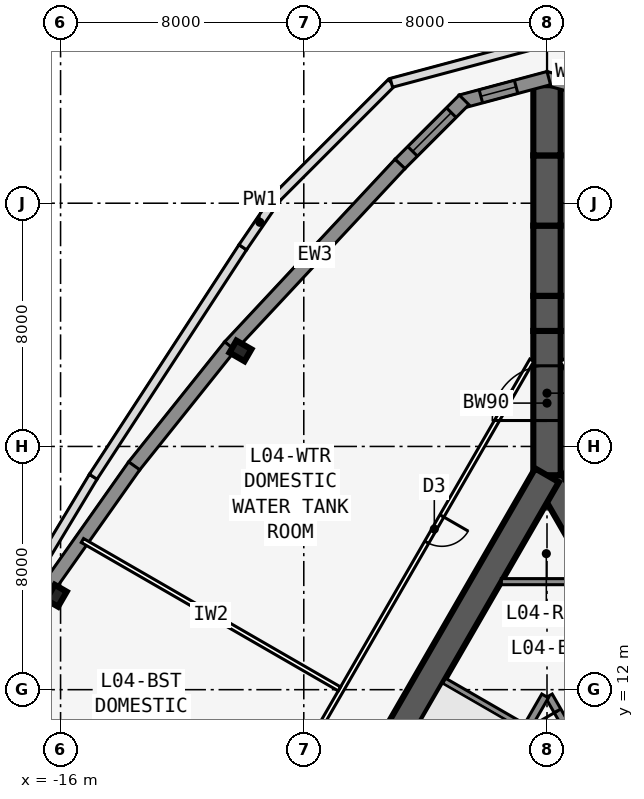
"""IFC4 building model, lengths in metres.
Left out: names, types, materials, properties, quantities, classifications, styles, units other than length and angle.
Written with IfcOpenShell. Run it as: python <this file> out.ifc"""

import sys

from ifc_helpers import new_model, si_unit, direction, frame, frame_2d, origin, origin_2d, place, context, subcontext, project, spatial, polyline, rectangle, i_section, outline, extrude, element, fill, save


model = new_model("IFC4")
c1 = context("Model", 3, precision=1e-05, world=origin(), true_north=direction((0.0, 1.0)))
c2 = subcontext(c1, "Body", "Model", "MODEL_VIEW")
j1 = project(units=[si_unit("LENGTHUNIT", "METRE"), si_unit("PLANEANGLEUNIT", "RADIAN")], contexts=[c1])
p1 = place(None, origin())
s1 = spatial("IfcSite", under=j1, at=p1, CompositionType="ELEMENT")
p2 = place(p1, origin())
s2 = spatial("IfcBuilding", under=s1, at=p2, CompositionType="ELEMENT")
p3 = place(p2, frame((0.0, 0.0, 22.5)))
s3 = spatial("IfcBuildingStorey", under=s2, at=p3, CompositionType="ELEMENT", Elevation=22.5)
p4 = place(p3, frame((16.5, -9.526, 0.0), z_axis=(0.0, 0.0, 1.0), x_axis=(-0.499999749417, 0.866025548458, 0.0)))
e1 = element("IfcWall", 1, at=p4, inside=s3, PredefinedType="SHEAR", context=c2, shape_type="SweptSolid", body=[
    extrude(rectangle(XDim=33.0, YDim=0.9, at=frame_2d((16.5, 0.0))), origin(), (0.0, 0.0, 1.0), 6.0),
])
p5 = place(p4, frame((14.15, 0.0, 0.0)))
e2 = element("IfcOpeningElement", 2, at=p5, cuts=e1, PredefinedType="OPENING", context=c2, shape_type="SweptSolid", body=[
    extrude(rectangle(XDim=1.8, YDim=2.13, at=frame_2d((0.9, 1.065))), frame((0.0, 0.46, 0.0), z_axis=(0.0, -1.0, 0.0), x_axis=(1.0, 0.0, 0.0)), (0.0, 0.0, 1.0), 0.92),
])
p6 = place(p4, frame((12.6, 0.0, 0.0)))
e3 = element("IfcOpeningElement", 3, at=p6, cuts=e1, PredefinedType="OPENING", context=c2, shape_type="SweptSolid", body=[
    extrude(rectangle(XDim=1.0, YDim=2.13, at=frame_2d((0.5, 1.065))), frame((0.0, 0.46, 0.0), z_axis=(0.0, -1.0, 0.0), x_axis=(1.0, 0.0, 0.0)), (0.0, 0.0, 1.0), 0.92),
])
p7 = place(p3, frame((5.379, 2.586, 0.0), z_axis=(0.0, 0.0, 1.0), x_axis=(-0.500001375892, 0.866024609411, 0.0)))
e4 = element("IfcWall", 4, at=p7, inside=s3, PredefinedType="SOLIDWALL", context=c2, shape_type="SweptSolid", body=[
    extrude(rectangle(XDim=10.633, YDim=0.25, at=frame_2d((5.316, 0.0))), origin(), (0.0, 0.0, 1.0), 5.835),
])
p8 = place(p7, frame((9.164, 0.0, 0.0)))
e5 = element("IfcOpeningElement", 5, at=p8, cuts=e4, PredefinedType="OPENING", context=c2, shape_type="SweptSolid", body=[
    extrude(rectangle(XDim=0.9, YDim=2.13, at=frame_2d((0.45, 1.065))), frame((0.0, 0.135, 0.0), z_axis=(0.0, -1.0, 0.0), x_axis=(1.0, 0.0, 0.0)), (0.0, 0.0, 1.0), 0.27),
])
p9 = place(p7, frame((1.0, 0.0, 0.0)))
e6 = element("IfcOpeningElement", 6, at=p9, cuts=e4, PredefinedType="OPENING", context=c2, shape_type="SweptSolid", body=[
    extrude(rectangle(XDim=1.1, YDim=2.13, at=frame_2d((0.55, 1.065))), frame((0.0, 0.135, 0.0), z_axis=(0.0, -1.0, 0.0), x_axis=(1.0, 0.0, 0.0)), (0.0, 0.0, 1.0), 0.27),
])
p10 = place(p7, frame((3.9, 0.0, 0.0)))
e7 = element("IfcOpeningElement", 7, at=p10, cuts=e4, PredefinedType="OPENING", context=c2, shape_type="SweptSolid", body=[
    extrude(rectangle(XDim=1.1, YDim=2.13, at=frame_2d((0.55, 1.065))), frame((0.0, 0.135, 0.0), z_axis=(0.0, -1.0, 0.0), x_axis=(1.0, 0.0, 0.0)), (0.0, 0.0, 1.0), 0.27),
])
p11 = place(p7, frame((6.8, 0.0, 0.0)))
e8 = element("IfcOpeningElement", 8, at=p11, cuts=e4, PredefinedType="OPENING", context=c2, shape_type="SweptSolid", body=[
    extrude(rectangle(XDim=1.1, YDim=2.13, at=frame_2d((0.55, 1.065))), frame((0.0, 0.135, 0.0), z_axis=(0.0, -1.0, 0.0), x_axis=(1.0, 0.0, 0.0)), (0.0, 0.0, 1.0), 0.27),
])
p12 = place(p3, frame((0.0, 19.052, 0.0), z_axis=(0.0, 0.0, 1.0), x_axis=(-0.499999749417, -0.866025548458, 0.0)))
e9 = element("IfcWall", 9, at=p12, inside=s3, PredefinedType="SHEAR", context=c2, shape_type="SweptSolid", body=[
    extrude(rectangle(XDim=33.0, YDim=0.9, at=frame_2d((16.5, 0.0))), origin(), (0.0, 0.0, 1.0), 6.0),
])
p13 = place(p12, frame((14.15, 0.0, 0.0)))
e10 = element("IfcOpeningElement", 10, at=p13, cuts=e9, PredefinedType="OPENING", context=c2, shape_type="SweptSolid", body=[
    extrude(rectangle(XDim=1.8, YDim=2.13, at=frame_2d((0.9, 1.065))), frame((0.0, 0.46, 0.0), z_axis=(0.0, -1.0, 0.0), x_axis=(1.0, 0.0, 0.0)), (0.0, 0.0, 1.0), 0.92),
])
p14 = place(p12, frame((12.6, 0.0, 0.0)))
e11 = element("IfcOpeningElement", 11, at=p14, cuts=e9, PredefinedType="OPENING", context=c2, shape_type="SweptSolid", body=[
    extrude(rectangle(XDim=1.0, YDim=2.13, at=frame_2d((0.5, 1.065))), frame((0.0, 0.46, 0.0), z_axis=(0.0, -1.0, 0.0), x_axis=(1.0, 0.0, 0.0)), (0.0, 0.0, 1.0), 0.92),
])
p15 = place(p3, frame((-0.062, 11.794, 0.0), z_axis=(0.0, 0.0, 1.0), x_axis=(-0.500006680225, -0.86602154692, 0.0)))
e12 = element("IfcWall", 12, at=p15, inside=s3, PredefinedType="SOLIDWALL", context=c2, shape_type="SweptSolid", body=[
    extrude(rectangle(XDim=7.733, YDim=0.25, at=frame_2d((3.866, 0.0))), origin(), (0.0, 0.0, 1.0), 5.835),
])
p16 = place(p3, frame((-0.679, 10.727, 0.0), z_axis=(0.0, 0.0, 1.0), x_axis=(-0.866022959057, 0.500004234368, 0.0)))
e13 = element("IfcWall", 13, at=p16, inside=s3, PredefinedType="SOLIDWALL", context=c2, shape_type="SweptSolid", body=[
    extrude(rectangle(XDim=3.125, YDim=0.2, at=frame_2d((1.562, 0.0))), origin(), (0.0, 0.0, 1.0), 5.835),
])
p17 = place(p3, frame((0.0, 19.052, 0.0), z_axis=(0.0, 0.0, 1.0), x_axis=(0.0, 1.0, 0.0)))
e14 = element("IfcWall", 14, at=p17, inside=s3, PredefinedType="SHEAR", context=c2, shape_type="SweptSolid", body=[
    extrude(rectangle(XDim=4.746, YDim=0.9, at=frame_2d((2.373, 0.0))), origin(), (0.0, 0.0, 1.0), 6.0),
])
p18 = place(p17, frame((1.8, 0.0, 0.0)))
e15 = element("IfcOpeningElement", 15, at=p18, cuts=e14, PredefinedType="OPENING", context=c2, shape_type="SweptSolid", body=[
    extrude(rectangle(XDim=1.8, YDim=2.13, at=frame_2d((0.9, 1.065))), frame((0.0, 0.46, 0.0), z_axis=(0.0, -1.0, 0.0), x_axis=(1.0, 0.0, 0.0)), (0.0, 0.0, 1.0), 0.92),
])
p19 = place(p3, frame((0.0, 23.799, 0.0), z_axis=(0.0, 0.0, 1.0), x_axis=(0.0, 1.0, 0.0)))
e16 = element("IfcWall", 16, at=p19, inside=s3, PredefinedType="SHEAR", context=c2, shape_type="SweptSolid", body=[
    extrude(rectangle(XDim=1.155, YDim=0.9, at=frame_2d((0.577, 0.0))), origin(), (0.0, 0.0, 1.0), 6.0),
])
p20 = place(p3, frame((0.0, 24.953, 0.0), z_axis=(0.0, 0.0, 1.0), x_axis=(0.0, 1.0, 0.0)))
e17 = element("IfcWall", 17, at=p20, inside=s3, PredefinedType="SHEAR", context=c2, shape_type="SweptSolid", body=[
    extrude(rectangle(XDim=2.309, YDim=0.9, at=frame_2d((1.155, 0.0))), origin(), (0.0, 0.0, 1.0), 6.0),
])
p21 = place(p3, frame((0.0, 27.263, 0.0), z_axis=(0.0, 0.0, 1.0), x_axis=(0.0, 1.0, 0.0)))
e18 = element("IfcWall", 18, at=p21, inside=s3, PredefinedType="SHEAR", context=c2, shape_type="SweptSolid", body=[
    extrude(rectangle(XDim=2.31, YDim=0.9, at=frame_2d((1.155, 0.0))), origin(), (0.0, 0.0, 1.0), 6.0),
])
p22 = place(p3, frame((0.0, 29.572, 0.0), z_axis=(0.0, 0.0, 1.0), x_axis=(0.0, 1.0, 0.0)))
e19 = element("IfcWall", 19, at=p22, inside=s3, PredefinedType="SHEAR", context=c2, shape_type="SweptSolid", body=[
    extrude(rectangle(XDim=2.309, YDim=0.9, at=frame_2d((1.155, 0.0))), origin(), (0.0, 0.0, 1.0), 6.0),
])
for number, where, z_axis, x_axis in (
    (20, (-10.083, 23.142, 0.0), (0.0, 0.0, 1.0), (-0.5, -0.866, 0.0)),
    (21, (-16.137, 15.09, 0.0), (0.0, 0.0, 1.0), (-0.866, 0.5, 0.0)),
):
    element("IfcColumn", number, at=place(p3, frame(where, z_axis=z_axis, x_axis=x_axis)), inside=s3, PredefinedType="COLUMN", context=c2, shape_type="SweptSolid", body=[
        extrude(i_section(OverallWidth=0.455, OverallDepth=0.569, WebThickness=0.078, FlangeThickness=0.125, at=origin_2d()), origin(), (0.0, 0.0, 1.0), 6.0),
    ])
p23 = place(p3, frame((2.829, 31.341, 0.0), z_axis=(0.0, 0.0, 1.0), x_axis=(-0.965930548995, 0.258801419081, 0.0)))
e22 = element("IfcWall", 22, at=p23, inside=s3, PredefinedType="SOLIDWALL", context=c2, shape_type="SweptSolid", body=[
    extrude(outline(polyline([(2.989, 0.225), (2.929, 0.225), (2.438, 0.093), (2.402, 0.225), (0.0, 0.225), (0.0, -0.225), (2.989, -0.225), (2.989, 0.225)])), origin(), (0.0, 0.0, 1.0), 5.835),
])
p24 = place(p23, frame((0.676, 0.0, 0.9)))
e23 = element("IfcOpeningElement", 23, at=p24, cuts=e22, PredefinedType="OPENING", context=c2, shape_type="SweptSolid", body=[
    extrude(rectangle(XDim=1.2, YDim=3.6, at=frame_2d((0.6, 1.8))), frame((0.0, 0.235, 0.0), z_axis=(0.0, -1.0, 0.0), x_axis=(1.0, 0.0, 0.0)), (0.0, 0.0, 1.0), 0.47),
])
p25 = place(p3, frame((0.058, 32.114, 0.0), z_axis=(0.0, 0.0, 1.0), x_axis=(-0.965930548995, -0.258801419081, 0.0)))
e24 = element("IfcWall", 24, at=p25, inside=s3, PredefinedType="SOLIDWALL", context=c2, shape_type="SweptSolid", body=[
    extrude(outline(polyline([(2.989, 0.225), (0.586, 0.225), (0.551, 0.093), (0.059, 0.225), (0.0, 0.225), (0.0, -0.225), (2.989, -0.225), (2.989, 0.225)])), origin(), (0.0, 0.0, 1.0), 5.835),
])
p26 = place(p25, frame((1.113, 0.0, 0.9)))
e25 = element("IfcOpeningElement", 25, at=p26, cuts=e24, PredefinedType="OPENING", context=c2, shape_type="SweptSolid", body=[
    extrude(rectangle(XDim=1.2, YDim=3.6, at=frame_2d((0.6, 1.8))), frame((0.0, 0.235, 0.0), z_axis=(0.0, -1.0, 0.0), x_axis=(1.0, 0.0, 0.0)), (0.0, 0.0, 1.0), 0.47),
])
p27 = place(p3, frame((-2.728, 31.399, 0.0), z_axis=(0.0, 0.0, 1.0), x_axis=(-0.707106781187, -0.707106781187, 0.0)))
e26 = element("IfcWall", 26, at=p27, inside=s3, PredefinedType="SOLIDWALL", context=c2, shape_type="SweptSolid", body=[
    extrude(rectangle(XDim=2.988, YDim=0.45, at=frame_2d((1.494, 0.0))), origin(), (0.0, 0.0, 1.0), 5.835),
])
p28 = place(p27, frame((0.594, 0.0, 0.9)))
e27 = element("IfcOpeningElement", 27, at=p28, cuts=e26, PredefinedType="OPENING", context=c2, shape_type="SweptSolid", body=[
    extrude(rectangle(XDim=1.8, YDim=3.6, at=frame_2d((0.9, 1.8))), frame((0.0, 0.235, 0.0), z_axis=(0.0, -1.0, 0.0), x_axis=(1.0, 0.0, 0.0)), (0.0, 0.0, 1.0), 0.47),
])
p29 = place(p3, frame((-4.835, 29.292, 0.0), z_axis=(0.0, 0.0, 1.0), x_axis=(-0.682290707137, -0.73108097428, 0.0)))
e28 = element("IfcWall", 28, at=p29, inside=s3, PredefinedType="SOLIDWALL", context=c2, shape_type="SweptSolid", body=[
    extrude(outline(polyline([(0.0, 0.0), (8.211, 0.0), (8.211, 5.835), (0.0, 5.835), (0.0, 0.0)]), holes=[polyline([(6.406, 2.917), (6.327, 3.513), (6.097, 4.067), (5.732, 4.544), (5.256, 4.909), (4.701, 5.139), (4.106, 5.218), (3.51, 5.139), (2.956, 4.909), (2.479, 4.544), (2.114, 4.067), (1.884, 3.513), (1.806, 2.917), (1.884, 2.322), (2.114, 1.768), (2.479, 1.291), (2.956, 0.926), (3.51, 0.696), (4.106, 0.617), (4.701, 0.696), (5.256, 0.926), (5.732, 1.291), (6.097, 1.768), (6.327, 2.322), (6.406, 2.917)])]), frame((0.0, 0.225, 0.0), z_axis=(0.0, -1.0, 0.0), x_axis=(1.0, 0.0, 0.0)), (0.0, 0.0, 1.0), 0.45),
])
p30 = place(p3, frame((-10.427, 23.302, 0.0), z_axis=(0.0, 0.0, 1.0), x_axis=(-0.624594965756, -0.780948864364, 0.0)))
e29 = element("IfcWall", 29, at=p30, inside=s3, PredefinedType="SOLIDWALL", context=c2, shape_type="SweptSolid", body=[
    extrude(outline(polyline([(0.0, 0.0), (5.058, 0.0), (5.058, 5.835), (0.0, 5.835), (0.0, 0.0)]), holes=[polyline([(4.429, 2.917), (4.364, 3.409), (4.174, 3.867), (3.872, 4.261), (3.479, 4.563), (3.021, 4.753), (2.529, 4.817), (2.037, 4.753), (1.579, 4.563), (1.185, 4.261), (0.883, 3.867), (0.694, 3.409), (0.629, 2.917), (0.694, 2.426), (0.883, 1.968), (1.185, 1.574), (1.579, 1.272), (2.037, 1.082), (2.529, 1.018), (3.021, 1.082), (3.479, 1.272), (3.872, 1.574), (4.174, 1.968), (4.364, 2.426), (4.429, 2.917)])]), frame((0.0, 0.225, 0.0), z_axis=(0.0, -1.0, 0.0), x_axis=(1.0, 0.0, 0.0)), (0.0, 0.0, 1.0), 0.45),
])
p31 = place(p3, frame((-13.578, 19.363, 0.0), z_axis=(0.0, 0.0, 1.0), x_axis=(-0.5766431066, -0.81699616132, 0.0)))
e30 = element("IfcWall", 30, at=p31, inside=s3, PredefinedType="SOLIDWALL", context=c2, shape_type="SweptSolid", body=[
    extrude(outline(polyline([(0.0, 0.0), (5.021, 0.0), (5.021, 5.835), (0.0, 5.835), (0.0, 0.0)]), holes=[polyline([(4.41, 2.917), (4.346, 3.409), (4.156, 3.867), (3.854, 4.261), (3.46, 4.563), (3.002, 4.753), (2.51, 4.817), (2.019, 4.753), (1.56, 4.563), (1.167, 4.261), (0.865, 3.867), (0.675, 3.409), (0.61, 2.917), (0.675, 2.426), (0.865, 1.968), (1.167, 1.574), (1.56, 1.272), (2.019, 1.082), (2.51, 1.018), (3.002, 1.082), (3.46, 1.272), (3.854, 1.574), (4.156, 1.968), (4.346, 2.426), (4.41, 2.917)])]), frame((0.0, 0.225, 0.0), z_axis=(0.0, -1.0, 0.0), x_axis=(1.0, 0.0, 0.0)), (0.0, 0.0, 1.0), 0.45),
])
p32 = place(p3, frame((-16.466, 15.272, 0.0), z_axis=(0.0, 0.0, 1.0), x_axis=(-0.52611097126, -0.850415925251, 0.0)))
e31 = element("IfcWall", 31, at=p32, inside=s3, PredefinedType="SOLIDWALL", context=c2, shape_type="SweptSolid", body=[
    extrude(outline(polyline([(0.0, 0.0), (5.002, 0.0), (5.002, 5.835), (0.0, 5.835), (0.0, 0.0)]), holes=[polyline([(4.401, 2.917), (4.336, 3.409), (4.146, 3.867), (3.844, 4.261), (3.451, 4.563), (2.993, 4.753), (2.501, 4.817), (2.01, 4.753), (1.551, 4.563), (1.158, 4.261), (0.856, 3.867), (0.666, 3.409), (0.601, 2.917), (0.666, 2.426), (0.856, 1.968), (1.158, 1.574), (1.551, 1.272), (2.01, 1.082), (2.501, 1.018), (2.993, 1.082), (3.451, 1.272), (3.844, 1.574), (4.146, 1.968), (4.336, 2.426), (4.401, 2.917)])]), frame((0.0, 0.225, 0.0), z_axis=(0.0, -1.0, 0.0), x_axis=(1.0, 0.0, 0.0)), (0.0, 0.0, 1.0), 0.45),
])
p33 = place(p3, frame((-19.563, 11.295, 0.0), z_axis=(0.0, 0.0, 1.0), x_axis=(0.515513067343, 0.856881717274, 0.0)))
e32 = element("IfcWall", 32, at=p33, inside=s3, PredefinedType="PARAPET", context=c2, shape_type="SweptSolid", body=[
    extrude(rectangle(XDim=8.996, YDim=0.3, at=frame_2d((4.498, 0.0))), origin(), (0.0, 0.0, 1.0), 1.1),
])
p34 = place(p3, frame((-14.925, 19.003, 0.0), z_axis=(0.0, 0.0, 1.0), x_axis=(0.545976753286, 0.83780032518, 0.0)))
e33 = element("IfcWall", 33, at=p34, inside=s3, PredefinedType="PARAPET", context=c2, shape_type="SweptSolid", body=[
    extrude(rectangle(XDim=9.009, YDim=0.3, at=frame_2d((4.504, 0.0))), origin(), (0.0, 0.0, 1.0), 1.1),
])
p35 = place(p3, frame((-10.007, 26.551, 0.0), z_axis=(0.0, 0.0, 1.0), x_axis=(0.564147300062, 0.825674163235, 0.0)))
e34 = element("IfcWall", 34, at=p35, inside=s3, PredefinedType="PARAPET", context=c2, shape_type="SweptSolid", body=[
    extrude(rectangle(XDim=1.99, YDim=0.3, at=frame_2d((0.995, 0.0))), origin(), (0.0, 0.0, 1.0), 1.1),
])
p36 = place(p3, frame((-8.884, 28.194, 0.0), z_axis=(0.0, 0.0, 1.0), x_axis=(0.707106781187, 0.707106781187, 0.0)))
e35 = element("IfcWall", 35, at=p36, inside=s3, PredefinedType="PARAPET", context=c2, shape_type="SweptSolid", body=[
    extrude(rectangle(XDim=5.325, YDim=0.3, at=frame_2d((2.663, 0.0))), origin(), (0.0, 0.0, 1.0), 1.1),
])
for number, where, z_axis, x_axis in (
    (36, (-5.119, 31.959, 0.0), (0.0, 0.0, 1.0), (0.966, 0.259, 0.0)),
    (37, (0.0, 33.331, 0.0), (0.0, 0.0, 1.0), (0.966, -0.259, 0.0)),
):
    element("IfcWall", number, at=place(p3, frame(where, z_axis=z_axis, x_axis=x_axis)), inside=s3, PredefinedType="PARAPET", context=c2, shape_type="SweptSolid", body=[
        extrude(rectangle(XDim=5.299, YDim=0.3, at=frame_2d((2.65, 0.0))), origin(), (0.0, 0.0, 1.0), 1.1),
    ])
p37 = place(p3, frame((20.027, -10.985, 0.0), z_axis=(0.0, 0.0, 1.0), x_axis=(-0.500001677587, 0.866024435227, 0.0)))
e38 = element("IfcWall", 38, at=p37, inside=s3, PredefinedType="PARTITIONING", context=c2, shape_type="SweptSolid", body=[
    extrude(rectangle(XDim=39.054, YDim=0.15, at=frame_2d((19.527, 0.0))), origin(), (0.0, 0.0, 1.0), 5.835),
])
p38 = place(p37, frame((6.914, 0.0, 0.0)))
e39 = element("IfcOpeningElement", 39, at=p38, cuts=e38, PredefinedType="OPENING", context=c2, shape_type="SweptSolid", body=[
    extrude(rectangle(XDim=1.0, YDim=2.13, at=frame_2d((0.5, 1.065))), frame((0.0, 0.085, 0.0), z_axis=(0.0, -1.0, 0.0), x_axis=(1.0, 0.0, 0.0)), (0.0, 0.0, 1.0), 0.17),
])
p39 = place(p37, frame((18.527, 0.0, 0.0)))
e40 = element("IfcOpeningElement", 40, at=p39, cuts=e38, PredefinedType="OPENING", context=c2, shape_type="SweptSolid", body=[
    extrude(rectangle(XDim=1.0, YDim=2.13, at=frame_2d((0.5, 1.065))), frame((0.0, 0.085, 0.0), z_axis=(0.0, -1.0, 0.0), x_axis=(1.0, 0.0, 0.0)), (0.0, 0.0, 1.0), 0.17),
])
p40 = place(p37, frame((30.64, 0.0, 0.0)))
e41 = element("IfcOpeningElement", 41, at=p40, cuts=e38, PredefinedType="OPENING", context=c2, shape_type="SweptSolid", body=[
    extrude(rectangle(XDim=1.0, YDim=2.13, at=frame_2d((0.5, 1.065))), frame((0.0, 0.085, 0.0), z_axis=(0.0, -1.0, 0.0), x_axis=(1.0, 0.0, 0.0)), (0.0, 0.0, 1.0), 0.17),
])
p41 = place(p3, frame((-0.5, 22.836, 0.0), z_axis=(0.0, 0.0, 1.0), x_axis=(-0.500001677587, -0.866024435227, 0.0)))
e42 = element("IfcWall", 42, at=p41, inside=s3, PredefinedType="PARTITIONING", context=c2, shape_type="SweptSolid", body=[
    extrude(rectangle(XDim=39.054, YDim=0.15, at=frame_2d((19.527, 0.0))), origin(), (0.0, 0.0, 1.0), 5.835),
])
p42 = place(p41, frame((5.914, 0.0, 0.0)))
e43 = element("IfcOpeningElement", 43, at=p42, cuts=e42, PredefinedType="OPENING", context=c2, shape_type="SweptSolid", body=[
    extrude(rectangle(XDim=1.0, YDim=2.13, at=frame_2d((0.5, 1.065))), frame((0.0, 0.085, 0.0), z_axis=(0.0, -1.0, 0.0), x_axis=(1.0, 0.0, 0.0)), (0.0, 0.0, 1.0), 0.17),
])
p43 = place(p41, frame((16.527, 0.0, 0.0)))
e44 = element("IfcOpeningElement", 44, at=p43, cuts=e42, PredefinedType="OPENING", context=c2, shape_type="SweptSolid", body=[
    extrude(rectangle(XDim=1.0, YDim=2.13, at=frame_2d((0.5, 1.065))), frame((0.0, 0.085, 0.0), z_axis=(0.0, -1.0, 0.0), x_axis=(1.0, 0.0, 0.0)), (0.0, 0.0, 1.0), 0.17),
])
p44 = place(p41, frame((29.64, 0.0, 0.0)))
e45 = element("IfcOpeningElement", 45, at=p44, cuts=e42, PredefinedType="OPENING", context=c2, shape_type="SweptSolid", body=[
    extrude(rectangle(XDim=1.0, YDim=2.13, at=frame_2d((0.5, 1.065))), frame((0.0, 0.085, 0.0), z_axis=(0.0, -1.0, 0.0), x_axis=(1.0, 0.0, 0.0)), (0.0, 0.0, 1.0), 0.17),
])
p45 = place(p3, frame((-6.829, 12.025, 0.0), z_axis=(0.0, 0.0, 1.0), x_axis=(-0.866025631456, 0.499999605661, 0.0)))
e46 = element("IfcWall", 46, at=p45, inside=s3, PredefinedType="PARTITIONING", context=c2, shape_type="SweptSolid", body=[
    extrude(rectangle(XDim=9.76, YDim=0.15, at=frame_2d((4.88, 0.0))), origin(), (0.0, 0.0, 1.0), 5.835),
])
p46 = place(p3, frame((-1.501, 15.552, 0.0), z_axis=(0.0, 0.0, 1.0), x_axis=(1.0, 0.0, 0.0)))
e47 = element("IfcWall", 47, at=p46, inside=s3, PredefinedType="SOLIDWALL", context=c2, shape_type="SweptSolid", body=[
    extrude(rectangle(XDim=3.002, YDim=0.2, at=frame_2d((1.501, 0.0))), origin(), (0.0, 0.0, 1.0), 5.835),
])
p47 = place(p26, origin())
e48 = element("IfcWindow", 48, at=p47, inside=s3, PartitioningType="SINGLE_PANEL", PredefinedType="WINDOW", context=c2, shape_type="SweptSolid", body=[
    extrude(rectangle(XDim=1.2, YDim=3.6, at=frame_2d((0.6, 1.8))), frame((0.0, 0.03, 0.0), z_axis=(0.0, -1.0, 0.0), x_axis=(1.0, 0.0, 0.0)), (0.0, 0.0, 1.0), 0.06),
])
fill(e25, e48)
p48 = place(p28, origin())
e49 = element("IfcWindow", 49, at=p48, inside=s3, PartitioningType="SINGLE_PANEL", PredefinedType="WINDOW", context=c2, shape_type="SweptSolid", body=[
    extrude(rectangle(XDim=1.8, YDim=3.6, at=frame_2d((0.9, 1.8))), frame((0.0, 0.03, 0.0), z_axis=(0.0, -1.0, 0.0), x_axis=(1.0, 0.0, 0.0)), (0.0, 0.0, 1.0), 0.06),
])
fill(e27, e49)
p49 = place(p42, origin())
e50 = element("IfcDoor", 50, at=p49, inside=s3, OperationType="SINGLE_SWING_LEFT", PredefinedType="DOOR", context=c2, shape_type="SweptSolid", body=[
    extrude(rectangle(XDim=1.0, YDim=2.13, at=frame_2d((0.5, 1.065))), frame((0.0, 0.025, 0.0), z_axis=(0.0, -1.0, 0.0), x_axis=(1.0, 0.0, 0.0)), (0.0, 0.0, 1.0), 0.05),
])
fill(e43, e50)
p50 = place(p18, origin())
e51 = element("IfcDoor", 51, at=p50, inside=s3, OperationType="DOUBLE_DOOR_DOUBLE_SWING", PredefinedType="DOOR", context=c2, shape_type="SweptSolid", body=[
    extrude(rectangle(XDim=1.8, YDim=2.13, at=frame_2d((0.9, 1.065))), frame((0.0, 0.025, 0.0), z_axis=(0.0, -1.0, 0.0), x_axis=(1.0, 0.0, 0.0)), (0.0, 0.0, 1.0), 0.05),
])
fill(e15, e51)
p51 = place(p8, origin())
e52 = element("IfcDoor", 52, at=p51, inside=s3, OperationType="SINGLE_SWING_RIGHT", PredefinedType="DOOR", context=c2, shape_type="SweptSolid", body=[
    extrude(rectangle(XDim=0.9, YDim=2.13, at=frame_2d((0.45, 1.065))), frame((0.0, 0.025, 0.0), z_axis=(0.0, -1.0, 0.0), x_axis=(1.0, 0.0, 0.0)), (0.0, 0.0, 1.0), 0.05),
])
fill(e5, e52)
save(model, sys.argv[1])
